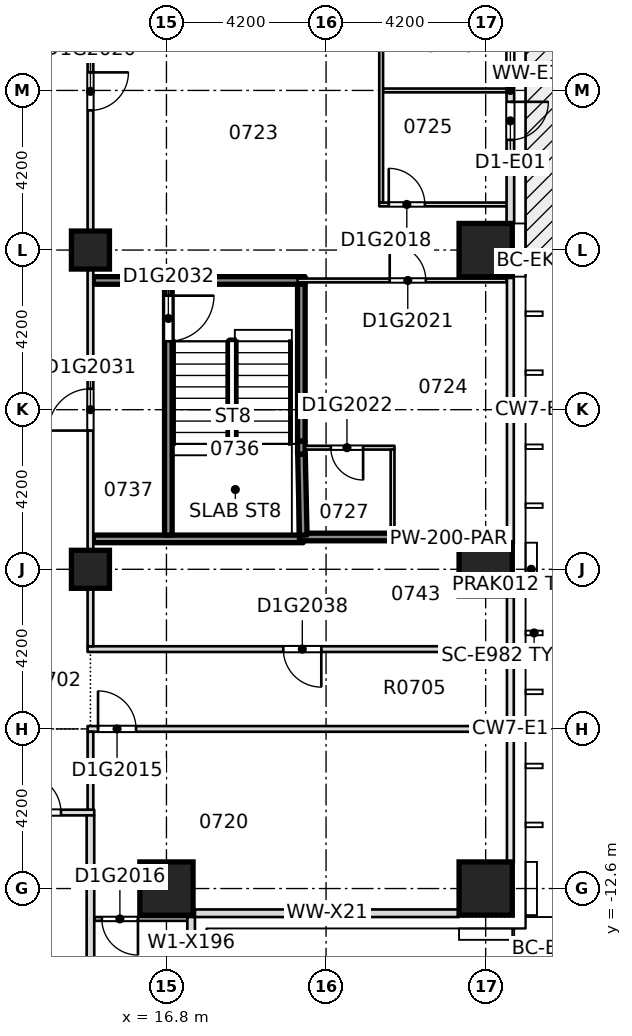
"""IFC4 building model, lengths in metres.
Left out: names, types, materials, properties, quantities, classifications, styles, units other than length and angle.
Written with IfcOpenShell. Run it as: python <this file> out.ifc"""

import sys

from ifc_helpers import new_model, si_unit, direction, frame, frame_2d, origin, origin_2d, place, context, subcontext, project, spatial, rectangle, extrude, element, fill, save


model = new_model("IFC4")
c1 = context("Model", 3, precision=1e-05, world=origin(), true_north=direction((0.0, 1.0)))
c2 = subcontext(c1, "Body", "Model", "MODEL_VIEW")
j1 = project(units=[si_unit("LENGTHUNIT", "METRE"), si_unit("PLANEANGLEUNIT", "RADIAN")], contexts=[c1])
p1 = place(None, origin())
s1 = spatial("IfcSite", under=j1, at=p1, CompositionType="ELEMENT")
p2 = place(p1, origin())
s2 = spatial("IfcBuilding", under=s1, at=p2, CompositionType="ELEMENT")
p3 = place(p2, frame((0.0, 0.0, 37.95)))
s3 = spatial("IfcBuildingStorey", under=s2, at=p3, CompositionType="ELEMENT", Elevation=37.95)
for number, where, z_axis, x_axis in (
    (1, (16.8, -12.6, -0.32), (0.0, 0.0, 1.0), (1.0, 0.0, 0.0)),
    (2, (25.2, -12.6, -0.32), (0.0, 0.0, 1.0), (1.0, 0.0, 0.0)),
    (3, (25.2, -4.2, -0.32), (0.0, 0.0, 1.0), (1.0, 0.0, 0.0)),
    (4, (25.2, 4.2, -0.32), (0.0, 0.0, 1.0), (1.0, 0.0, 0.0)),
):
    element("IfcColumn", number, at=place(p3, frame(where, z_axis=z_axis, x_axis=x_axis)), inside=s3, PredefinedType="COLUMN", context=c2, shape_type="SweptSolid", body=[
        extrude(rectangle(XDim=1.4, YDim=1.4, at=origin_2d()), origin(), (0.0, 0.0, 1.0), 3.45),
    ])
for number, where, z_axis, x_axis in (
    (5, (14.8, -4.2, -0.32), (0.0, 0.0, 1.0), (1.0, 0.0, 0.0)),
    (6, (14.8, 4.2, -0.32), (0.0, 0.0, 1.0), (1.0, 0.0, 0.0)),
):
    element("IfcColumn", number, at=place(p3, frame(where, z_axis=z_axis, x_axis=x_axis)), inside=s3, PredefinedType="COLUMN", context=c2, shape_type="SweptSolid", body=[
        extrude(rectangle(XDim=1.0, YDim=1.0, at=origin_2d()), origin(), (0.0, 0.0, 1.0), 3.45),
    ])
p4 = place(p3, frame((14.9, -13.4, 0.0), z_axis=(0.0, 0.0, 1.0), x_axis=(1.0, 0.0, 0.0)))
e7 = element("IfcWall", 7, at=p4, inside=s3, PredefinedType="PARTITIONING", context=c2, shape_type="SweptSolid", body=[
    extrude(rectangle(XDim=2.45, YDim=0.1, at=frame_2d((1.225, 0.0))), origin(), (0.0, 0.0, 1.0), 3.13),
])
p5 = place(p4, frame((0.2, 0.0, 0.0)))
e8 = element("IfcOpeningElement", 8, at=p5, cuts=e7, PredefinedType="OPENING", context=c2, shape_type="SweptSolid", body=[
    extrude(rectangle(XDim=0.95, YDim=2.1, at=frame_2d((0.475, 1.05))), frame((0.0, 0.06, 0.0), z_axis=(0.0, -1.0, 0.0), x_axis=(1.0, 0.0, 0.0)), (0.0, 0.0, 1.0), 0.12),
])
p6 = place(p3, frame((8.5, -10.6, 0.0), z_axis=(0.0, 0.0, 1.0), x_axis=(1.0, 0.0, 0.0)))
e9 = element("IfcWall", 9, at=p6, inside=s3, PredefinedType="PARTITIONING", context=c2, shape_type="SweptSolid", body=[
    extrude(rectangle(XDim=6.4, YDim=0.15, at=frame_2d((3.2, 0.0))), origin(), (0.0, 0.0, 1.0), 3.13),
])
p7 = place(p6, frame((1.35, 0.0, 0.0)))
e10 = element("IfcOpeningElement", 10, at=p7, cuts=e9, PredefinedType="OPENING", context=c2, shape_type="SweptSolid", body=[
    extrude(rectangle(XDim=1.1, YDim=2.1, at=frame_2d((0.55, 1.05))), frame((0.0, 0.085, 0.0), z_axis=(0.0, -1.0, 0.0), x_axis=(1.0, 0.0, 0.0)), (0.0, 0.0, 1.0), 0.17),
])
p8 = place(p6, frame((4.525, 0.0, 0.0)))
e11 = element("IfcOpeningElement", 11, at=p8, cuts=e9, PredefinedType="OPENING", context=c2, shape_type="SweptSolid", body=[
    extrude(rectangle(XDim=1.0, YDim=2.1, at=frame_2d((0.5, 1.05))), frame((0.0, 0.085, 0.0), z_axis=(0.0, -1.0, 0.0), x_axis=(1.0, 0.0, 0.0)), (0.0, 0.0, 1.0), 0.17),
])
p9 = place(p3, frame((14.725, -8.4, 0.0), z_axis=(0.0, 0.0, 1.0), x_axis=(1.0, 0.0, 0.0)))
e12 = element("IfcWall", 12, at=p9, inside=s3, PredefinedType="PARTITIONING", context=c2, shape_type="SweptSolid", body=[
    extrude(rectangle(XDim=11.025, YDim=0.15, at=frame_2d((5.512, 0.0))), origin(), (0.0, 0.0, 1.0), 3.13),
])
p10 = place(p9, frame((0.275, 0.0, 0.0)))
e13 = element("IfcOpeningElement", 13, at=p10, cuts=e12, PredefinedType="OPENING", context=c2, shape_type="SweptSolid", body=[
    extrude(rectangle(XDim=1.0, YDim=2.1, at=frame_2d((0.5, 1.05))), frame((0.0, 0.085, 0.0), z_axis=(0.0, -1.0, 0.0), x_axis=(1.0, 0.0, 0.0)), (0.0, 0.0, 1.0), 0.17),
])
p11 = place(p3, frame((14.725, -6.3, 0.0), z_axis=(0.0, 0.0, 1.0), x_axis=(1.0, 0.0, 0.0)))
e14 = element("IfcWall", 14, at=p11, inside=s3, PredefinedType="PARTITIONING", context=c2, shape_type="SweptSolid", body=[
    extrude(rectangle(XDim=11.025, YDim=0.15, at=frame_2d((5.512, 0.0))), origin(), (0.0, 0.0, 1.0), 3.13),
])
p12 = place(p11, frame((5.15, 0.0, 0.0)))
e15 = element("IfcOpeningElement", 15, at=p12, cuts=e14, PredefinedType="OPENING", context=c2, shape_type="SweptSolid", body=[
    extrude(rectangle(XDim=1.0, YDim=2.1, at=frame_2d((0.5, 1.05))), frame((0.0, 0.085, 0.0), z_axis=(0.0, -1.0, 0.0), x_axis=(1.0, 0.0, 0.0)), (0.0, 0.0, 1.0), 0.17),
])
p13 = place(p3, frame((14.875, -3.4, 0.0), z_axis=(0.0, 0.0, 1.0), x_axis=(1.0, 0.0, 0.0)))
e16 = element("IfcWall", 16, at=p13, inside=s3, PredefinedType="SOLIDWALL", context=c2, shape_type="SweptSolid", body=[
    extrude(rectangle(XDim=5.525, YDim=0.2, at=frame_2d((2.762, 0.0))), origin(), (0.0, 0.0, 1.0), 3.13),
])
p14 = place(p3, frame((20.3, -3.35, 0.0), z_axis=(0.0, 0.0, 1.0), x_axis=(1.0, 0.0, 0.0)))
e17 = element("IfcWall", 17, at=p14, inside=s3, PredefinedType="SOLIDWALL", context=c2, shape_type="SweptSolid", body=[
    extrude(rectangle(XDim=2.5, YDim=0.2, at=frame_2d((1.25, 0.0))), origin(), (0.0, 0.0, 1.0), 3.13),
])
p15 = place(p3, frame((22.7, -3.4, 0.0), z_axis=(0.0, 0.0, 1.0), x_axis=(1.0, 0.0, 0.0)))
e18 = element("IfcWall", 18, at=p15, inside=s3, PredefinedType="PARTITIONING", context=c2, shape_type="SweptSolid", body=[
    extrude(rectangle(XDim=3.05, YDim=0.2, at=frame_2d((1.525, 0.0))), origin(), (0.0, 0.0, 1.0), 3.13),
])
p16 = place(p3, frame((20.45, -1.0, 0.0), z_axis=(0.0, 0.0, 1.0), x_axis=(1.0, 0.0, 0.0)))
e19 = element("IfcWall", 19, at=p16, inside=s3, PredefinedType="PARTITIONING", context=c2, shape_type="SweptSolid", body=[
    extrude(rectangle(XDim=2.35, YDim=0.1, at=frame_2d((1.175, 0.0))), origin(), (0.0, 0.0, 1.0), 3.13),
])
p17 = place(p16, frame((0.675, 0.0, 0.0)))
e20 = element("IfcOpeningElement", 20, at=p17, cuts=e19, PredefinedType="OPENING", context=c2, shape_type="SweptSolid", body=[
    extrude(rectangle(XDim=0.85, YDim=2.1, at=frame_2d((0.425, 1.05))), frame((0.0, 0.06, 0.0), z_axis=(0.0, -1.0, 0.0), x_axis=(1.0, 0.0, 0.0)), (0.0, 0.0, 1.0), 0.12),
])
p18 = place(p3, frame((14.875, 3.4, 0.0), z_axis=(0.0, 0.0, 1.0), x_axis=(1.0, 0.0, 0.0)))
e21 = element("IfcWall", 21, at=p18, inside=s3, PredefinedType="SOLIDWALL", context=c2, shape_type="SweptSolid", body=[
    extrude(rectangle(XDim=5.575, YDim=0.2, at=frame_2d((2.788, 0.0))), origin(), (0.0, 0.0, 1.0), 3.13),
])
p19 = place(p3, frame((20.25, 3.4, 0.0), z_axis=(0.0, 0.0, 1.0), x_axis=(1.0, 0.0, 0.0)))
e22 = element("IfcWall", 22, at=p19, inside=s3, PredefinedType="PARTITIONING", context=c2, shape_type="SweptSolid", body=[
    extrude(rectangle(XDim=5.5, YDim=0.1, at=frame_2d((2.75, 0.0))), origin(), (0.0, 0.0, 1.0), 3.13),
])
p20 = place(p19, frame((2.425, 0.0, 0.0)))
e23 = element("IfcOpeningElement", 23, at=p20, cuts=e22, PredefinedType="OPENING", context=c2, shape_type="SweptSolid", body=[
    extrude(rectangle(XDim=0.95, YDim=2.1, at=frame_2d((0.475, 1.05))), frame((0.0, 0.06, 0.0), z_axis=(0.0, -1.0, 0.0), x_axis=(1.0, 0.0, 0.0)), (0.0, 0.0, 1.0), 0.12),
])
p21 = place(p3, frame((22.4, 5.4, 0.0), z_axis=(0.0, 0.0, 1.0), x_axis=(1.0, 0.0, 0.0)))
e24 = element("IfcWall", 24, at=p21, inside=s3, PredefinedType="PARTITIONING", context=c2, shape_type="SweptSolid", body=[
    extrude(rectangle(XDim=3.35, YDim=0.1, at=frame_2d((1.675, 0.0))), origin(), (0.0, 0.0, 1.0), 3.13),
])
p22 = place(p21, frame((0.25, 0.0, 0.0)))
e25 = element("IfcOpeningElement", 25, at=p22, cuts=e24, PredefinedType="OPENING", context=c2, shape_type="SweptSolid", body=[
    extrude(rectangle(XDim=0.95, YDim=2.1, at=frame_2d((0.475, 1.05))), frame((0.0, 0.06, 0.0), z_axis=(0.0, -1.0, 0.0), x_axis=(1.0, 0.0, 0.0)), (0.0, 0.0, 1.0), 0.12),
])
p23 = place(p3, frame((22.5, 8.4, 0.0), z_axis=(0.0, 0.0, 1.0), x_axis=(1.0, 0.0, 0.0)))
e26 = element("IfcWall", 26, at=p23, inside=s3, PredefinedType="PARTITIONING", context=c2, shape_type="SweptSolid", body=[
    extrude(rectangle(XDim=3.25, YDim=0.1, at=frame_2d((1.625, 0.0))), origin(), (0.0, 0.0, 1.0), 3.13),
])
p24 = place(p3, frame((14.8, -18.7, 0.0), z_axis=(0.0, 0.0, 1.0), x_axis=(0.0, 1.0, 0.0)))
e27 = element("IfcWall", 27, at=p24, inside=s3, PredefinedType="PARTITIONING", context=c2, shape_type="SweptSolid", body=[
    extrude(rectangle(XDim=8.025, YDim=0.2, at=frame_2d((4.012, 0.0))), origin(), (0.0, 0.0, 1.0), 3.13),
])
p25 = place(p3, frame((14.8, -10.525, 0.0), z_axis=(0.0, 0.0, 1.0), x_axis=(0.0, 1.0, 0.0)))
e28 = element("IfcWall", 28, at=p25, inside=s3, PredefinedType="PARTITIONING", context=c2, shape_type="SweptSolid", body=[
    extrude(rectangle(XDim=2.05, YDim=0.15, at=frame_2d((1.025, 0.0))), origin(), (0.0, 0.0, 1.0), 3.13),
])
p26 = place(p3, frame((14.8, -6.225, 0.0), z_axis=(0.0, 0.0, 1.0), x_axis=(0.0, 1.0, 0.0)))
e29 = element("IfcWall", 29, at=p26, inside=s3, PredefinedType="PARTITIONING", context=c2, shape_type="SweptSolid", body=[
    extrude(rectangle(XDim=27.775, YDim=0.15, at=frame_2d((13.888, 0.0))), origin(), (0.0, 0.0, 1.0), 3.13),
])
p27 = place(p26, frame((14.1, 0.0, 0.0)))
e30 = element("IfcOpeningElement", 30, at=p27, cuts=e29, PredefinedType="OPENING", context=c2, shape_type="SweptSolid", body=[
    extrude(rectangle(XDim=1.0, YDim=2.1, at=frame_2d((0.5, 1.05))), frame((0.0, 0.085, 0.0), z_axis=(0.0, -1.0, 0.0), x_axis=(1.0, 0.0, 0.0)), (0.0, 0.0, 1.0), 0.17),
])
p28 = place(p26, frame((21.175, 0.0, 0.0)))
e31 = element("IfcOpeningElement", 31, at=p28, cuts=e29, PredefinedType="OPENING", context=c2, shape_type="SweptSolid", body=[
    extrude(rectangle(XDim=0.95, YDim=2.1, at=frame_2d((0.475, 1.05))), frame((0.0, 0.085, 0.0), z_axis=(0.0, -1.0, 0.0), x_axis=(1.0, 0.0, 0.0)), (0.0, 0.0, 1.0), 0.17),
])
p29 = place(p26, frame((25.075, 0.0, 0.0)))
e32 = element("IfcOpeningElement", 32, at=p29, cuts=e29, PredefinedType="OPENING", context=c2, shape_type="SweptSolid", body=[
    extrude(rectangle(XDim=0.95, YDim=2.1, at=frame_2d((0.475, 1.05))), frame((0.0, 0.085, 0.0), z_axis=(0.0, -1.0, 0.0), x_axis=(1.0, 0.0, 0.0)), (0.0, 0.0, 1.0), 0.17),
])
p30 = place(p26, frame((5.675, 0.0, 0.0)))
e33 = element("IfcOpeningElement", 33, at=p30, cuts=e29, PredefinedType="OPENING", context=c2, shape_type="SweptSolid", body=[
    extrude(rectangle(XDim=1.1, YDim=2.1, at=frame_2d((0.55, 1.05))), frame((0.0, 0.085, 0.0), z_axis=(0.0, -1.0, 0.0), x_axis=(1.0, 0.0, 0.0)), (0.0, 0.0, 1.0), 0.17),
])
p31 = place(p3, frame((16.85, -3.3, 0.0), z_axis=(0.0, 0.0, 1.0), x_axis=(0.0, 1.0, 0.0)))
e34 = element("IfcWall", 34, at=p31, inside=s3, PredefinedType="SOLIDWALL", context=c2, shape_type="SweptSolid", body=[
    extrude(rectangle(XDim=6.6, YDim=0.2, at=frame_2d((3.3, 0.0))), origin(), (0.0, 0.0, 1.0), 3.13),
])
p32 = place(p31, frame((5.1, 0.0, 0.0)))
e35 = element("IfcOpeningElement", 35, at=p32, cuts=e34, PredefinedType="OPENING", context=c2, shape_type="SweptSolid", body=[
    extrude(rectangle(XDim=1.2, YDim=2.1, at=frame_2d((0.6, 1.05))), frame((0.0, 0.11, 0.0), z_axis=(0.0, -1.0, 0.0), x_axis=(1.0, 0.0, 0.0)), (0.0, 0.0, 1.0), 0.22),
])
p33 = place(p3, frame((20.4, -3.3, 0.0), z_axis=(0.0, 0.0, 1.0), x_axis=(-0.021771342749, 0.999762976227, 0.0)))
e36 = element("IfcWall", 36, at=p33, inside=s3, PredefinedType="SOLIDWALL", context=c2, shape_type="SweptSolid", body=[
    extrude(rectangle(XDim=2.131, YDim=0.2, at=frame_2d((1.065, 0.0))), origin(), (0.0, 0.0, 1.0), 3.13),
])
p34 = place(p3, frame((20.35, -0.83, 0.0), z_axis=(0.0, 0.0, 1.0), x_axis=(0.0, 1.0, 0.0)))
e37 = element("IfcWall", 37, at=p34, inside=s3, PredefinedType="SOLIDWALL", context=c2, shape_type="SweptSolid", body=[
    extrude(rectangle(XDim=4.13, YDim=0.2, at=frame_2d((2.065, 0.0))), origin(), (0.0, 0.0, 1.0), 3.13),
])
p35 = place(p3, frame((22.45, 5.45, 0.0), z_axis=(0.0, 0.0, 1.0), x_axis=(0.0, 1.0, 0.0)))
e38 = element("IfcWall", 38, at=p35, inside=s3, PredefinedType="PARTITIONING", context=c2, shape_type="SweptSolid", body=[
    extrude(rectangle(XDim=7.7, YDim=0.1, at=frame_2d((3.85, 0.0))), origin(), (0.0, 0.0, 1.0), 3.13),
])
p36 = place(p35, frame((4.95, 0.0, 0.0)))
e39 = element("IfcOpeningElement", 39, at=p36, cuts=e38, PredefinedType="OPENING", context=c2, shape_type="SweptSolid", body=[
    extrude(rectangle(XDim=0.95, YDim=2.1, at=frame_2d((0.475, 1.05))), frame((0.0, 0.06, 0.0), z_axis=(0.0, -1.0, 0.0), x_axis=(1.0, 0.0, 0.0)), (0.0, 0.0, 1.0), 0.12),
])
p37 = place(p3, frame((22.75, -3.3, 0.0), z_axis=(0.0, 0.0, 1.0), x_axis=(0.0, 1.0, 0.0)))
e40 = element("IfcWall", 40, at=p37, inside=s3, PredefinedType="PARTITIONING", context=c2, shape_type="SweptSolid", body=[
    extrude(rectangle(XDim=2.25, YDim=0.1, at=frame_2d((1.125, 0.0))), origin(), (0.0, 0.0, 1.0), 3.13),
])
p38 = place(p3, frame((17.45, -20.3, 0.0), z_axis=(0.0, 0.0, 1.0), x_axis=(0.0, 1.0, 0.0)))
e41 = element("IfcWall", 41, at=p38, inside=s3, PredefinedType="STANDARD", context=c2, shape_type="SweptSolid", body=[
    extrude(rectangle(XDim=6.95, YDim=0.2, at=frame_2d((3.475, 0.0))), origin(), (0.0, 0.0, 1.0), 3.13),
])
p39 = place(p38, frame((1.72, 0.0, 0.2)))
e42 = element("IfcOpeningElement", 42, at=p39, cuts=e41, PredefinedType="OPENING", context=c2, shape_type="SweptSolid", body=[
    extrude(rectangle(XDim=1.8, YDim=2.65, at=frame_2d((0.9, 1.325))), frame((0.0, 0.11, 0.0), z_axis=(0.0, -1.0, 0.0), x_axis=(1.0, 0.0, 0.0)), (0.0, 0.0, 1.0), 0.22),
])
p40 = place(p38, frame((3.775, 0.0, 0.2)))
e43 = element("IfcOpeningElement", 43, at=p40, cuts=e41, PredefinedType="OPENING", context=c2, shape_type="SweptSolid", body=[
    extrude(rectangle(XDim=1.8, YDim=2.65, at=frame_2d((0.9, 1.325))), frame((0.0, 0.11, 0.0), z_axis=(0.0, -1.0, 0.0), x_axis=(1.0, 0.0, 0.0)), (0.0, 0.0, 1.0), 0.22),
])
p41 = place(p3, frame((17.55, -13.25, 0.0), z_axis=(0.0, 0.0, 1.0), x_axis=(1.0, 0.0, 0.0)))
e44 = element("IfcWall", 44, at=p41, inside=s3, PredefinedType="STANDARD", context=c2, shape_type="SweptSolid", body=[
    extrude(rectangle(XDim=6.95, YDim=0.2, at=frame_2d((3.475, 0.0))), origin(), (0.0, 0.0, 1.0), 3.13),
])
p42 = place(p3, frame((25.85, 4.9, 0.0), z_axis=(0.0, 0.0, 1.0), x_axis=(0.0, 1.0, 0.0)))
e45 = element("IfcWall", 45, at=p42, inside=s3, PredefinedType="STANDARD", context=c2, shape_type="SweptSolid", body=[
    extrude(rectangle(XDim=7.0, YDim=0.2, at=frame_2d((3.5, 0.0))), origin(), (0.0, 0.0, 1.0), 3.13),
])
p43 = place(p42, frame((2.2, 0.0, 0.0)))
e46 = element("IfcOpeningElement", 46, at=p43, cuts=e45, PredefinedType="OPENING", context=c2, shape_type="SweptSolid", body=[
    extrude(rectangle(XDim=1.0, YDim=2.4, at=frame_2d((0.5, 1.2))), frame((0.0, 0.11, 0.0), z_axis=(0.0, -1.0, 0.0), x_axis=(1.0, 0.0, 0.0)), (0.0, 0.0, 1.0), 0.22),
])
p44 = place(p42, frame((3.8, 0.0, 0.2)))
e47 = element("IfcOpeningElement", 47, at=p44, cuts=e45, PredefinedType="OPENING", context=c2, shape_type="SweptSolid", body=[
    extrude(rectangle(XDim=1.8, YDim=2.65, at=frame_2d((0.9, 1.325))), frame((0.0, 0.11, 0.0), z_axis=(0.0, -1.0, 0.0), x_axis=(1.0, 0.0, 0.0)), (0.0, 0.0, 1.0), 0.22),
])
p45 = place(p42, frame((5.7, 0.0, 0.0)))
e48 = element("IfcOpeningElement", 48, at=p45, cuts=e45, PredefinedType="OPENING", context=c2, shape_type="SweptSolid", body=[
    extrude(rectangle(XDim=1.0, YDim=2.4, at=frame_2d((0.5, 1.2))), frame((0.0, 0.11, 0.0), z_axis=(0.0, -1.0, 0.0), x_axis=(1.0, 0.0, 0.0)), (0.0, 0.0, 1.0), 0.22),
])
p46 = place(p3, frame((20.35, -1.17, 0.0), z_axis=(0.0, 0.0, 1.0), x_axis=(0.0, 1.0, 0.0)))
e49 = element("IfcWall", 49, at=p46, inside=s3, PredefinedType="SOLIDWALL", context=c2, shape_type="SweptSolid", body=[
    extrude(rectangle(XDim=0.34, YDim=0.2, at=frame_2d((0.17, 0.0))), origin(), (0.0, 0.0, 1.0), 3.13),
])
p47 = place(p10, origin())
e50 = element("IfcDoor", 50, at=p47, inside=s3, OperationType="SINGLE_SWING_RIGHT", PredefinedType="DOOR", context=c2, shape_type="SweptSolid", body=[
    extrude(rectangle(XDim=1.0, YDim=2.1, at=frame_2d((0.5, 1.05))), frame((0.0, 0.025, 0.0), z_axis=(0.0, -1.0, 0.0), x_axis=(1.0, 0.0, 0.0)), (0.0, 0.0, 1.0), 0.05),
])
fill(e13, e50)
p48 = place(p5, origin())
e51 = element("IfcDoor", 51, at=p48, inside=s3, OperationType="SINGLE_SWING_RIGHT", PredefinedType="DOOR", context=c2, shape_type="SweptSolid", body=[
    extrude(rectangle(XDim=0.95, YDim=2.1, at=frame_2d((0.475, 1.05))), frame((0.0, 0.025, 0.0), z_axis=(0.0, -1.0, 0.0), x_axis=(1.0, 0.0, 0.0)), (0.0, 0.0, 1.0), 0.05),
])
fill(e8, e51)
p49 = place(p22, origin())
e52 = element("IfcDoor", 52, at=p49, inside=s3, OperationType="SINGLE_SWING_LEFT", PredefinedType="DOOR", context=c2, shape_type="SweptSolid", body=[
    extrude(rectangle(XDim=0.95, YDim=2.1, at=frame_2d((0.475, 1.05))), frame((0.0, 0.025, 0.0), z_axis=(0.0, -1.0, 0.0), x_axis=(1.0, 0.0, 0.0)), (0.0, 0.0, 1.0), 0.05),
])
fill(e25, e52)
p50 = place(p27, origin())
e53 = element("IfcDoor", 53, at=p50, inside=s3, OperationType="SINGLE_SWING_RIGHT", PredefinedType="DOOR", context=c2, shape_type="SweptSolid", body=[
    extrude(rectangle(XDim=1.0, YDim=2.1, at=frame_2d((0.5, 1.05))), frame((0.0, 0.025, 0.0), z_axis=(0.0, -1.0, 0.0), x_axis=(1.0, 0.0, 0.0)), (0.0, 0.0, 1.0), 0.05),
])
fill(e30, e53)
p51 = place(p20, origin())
e54 = element("IfcDoor", 54, at=p51, inside=s3, OperationType="SINGLE_SWING_LEFT", PredefinedType="DOOR", context=c2, shape_type="SweptSolid", body=[
    extrude(rectangle(XDim=0.95, YDim=2.1, at=frame_2d((0.475, 1.05))), frame((0.0, 0.025, 0.0), z_axis=(0.0, -1.0, 0.0), x_axis=(1.0, 0.0, 0.0)), (0.0, 0.0, 1.0), 0.05),
])
fill(e23, e54)
p52 = place(p17, origin())
e55 = element("IfcDoor", 55, at=p52, inside=s3, OperationType="SINGLE_SWING_RIGHT", PredefinedType="DOOR", context=c2, shape_type="SweptSolid", body=[
    extrude(rectangle(XDim=0.85, YDim=2.1, at=frame_2d((0.425, 1.05))), frame((0.0, 0.025, 0.0), z_axis=(0.0, -1.0, 0.0), x_axis=(1.0, 0.0, 0.0)), (0.0, 0.0, 1.0), 0.05),
])
fill(e20, e55)
p53 = place(p30, origin())
e56 = element("IfcDoor", 56, at=p53, inside=s3, OperationType="SINGLE_SWING_LEFT", PredefinedType="DOOR", context=c2, shape_type="SweptSolid", body=[
    extrude(rectangle(XDim=1.1, YDim=2.1, at=frame_2d((0.55, 1.05))), frame((0.0, 0.025, 0.0), z_axis=(0.0, -1.0, 0.0), x_axis=(1.0, 0.0, 0.0)), (0.0, 0.0, 1.0), 0.05),
])
fill(e33, e56)
p54 = place(p32, origin())
e57 = element("IfcDoor", 57, at=p54, inside=s3, OperationType="SINGLE_SWING_LEFT", PredefinedType="DOOR", context=c2, shape_type="SweptSolid", body=[
    extrude(rectangle(XDim=1.2, YDim=2.1, at=frame_2d((0.6, 1.05))), frame((0.0, 0.025, 0.0), z_axis=(0.0, -1.0, 0.0), x_axis=(1.0, 0.0, 0.0)), (0.0, 0.0, 1.0), 0.05),
])
fill(e35, e57)
p55 = place(p8, origin())
e58 = element("IfcDoor", 58, at=p55, inside=s3, OperationType="SINGLE_SWING_RIGHT", PredefinedType="DOOR", context=c2, shape_type="SweptSolid", body=[
    extrude(rectangle(XDim=1.0, YDim=2.1, at=frame_2d((0.5, 1.05))), frame((0.0, 0.025, 0.0), z_axis=(0.0, -1.0, 0.0), x_axis=(1.0, 0.0, 0.0)), (0.0, 0.0, 1.0), 0.05),
])
fill(e11, e58)
p56 = place(p12, origin())
e59 = element("IfcDoor", 59, at=p56, inside=s3, OperationType="SINGLE_SWING_RIGHT", PredefinedType="DOOR", context=c2, shape_type="SweptSolid", body=[
    extrude(rectangle(XDim=1.0, YDim=2.1, at=frame_2d((0.5, 1.05))), frame((0.0, 0.025, 0.0), z_axis=(0.0, -1.0, 0.0), x_axis=(1.0, 0.0, 0.0)), (0.0, 0.0, 1.0), 0.05),
])
fill(e15, e59)
p57 = place(p43, origin())
e60 = element("IfcDoor", 60, at=p57, inside=s3, OperationType="SINGLE_SWING_LEFT", PredefinedType="DOOR", context=c2, shape_type="SweptSolid", body=[
    extrude(rectangle(XDim=1.0, YDim=2.4, at=frame_2d((0.5, 1.2))), frame((0.0, 0.025, 0.0), z_axis=(0.0, -1.0, 0.0), x_axis=(1.0, 0.0, 0.0)), (0.0, 0.0, 1.0), 0.05),
])
fill(e46, e60)
p58 = place(p44, origin())
e61 = element("IfcWindow", 61, at=p58, inside=s3, PartitioningType="SINGLE_PANEL", PredefinedType="WINDOW", context=c2, shape_type="SweptSolid", body=[
    extrude(rectangle(XDim=1.8, YDim=2.65, at=frame_2d((0.9, 1.325))), frame((0.0, 0.03, 0.0), z_axis=(0.0, -1.0, 0.0), x_axis=(1.0, 0.0, 0.0)), (0.0, 0.0, 1.0), 0.06),
])
fill(e47, e61)
save(model, sys.argv[1])
